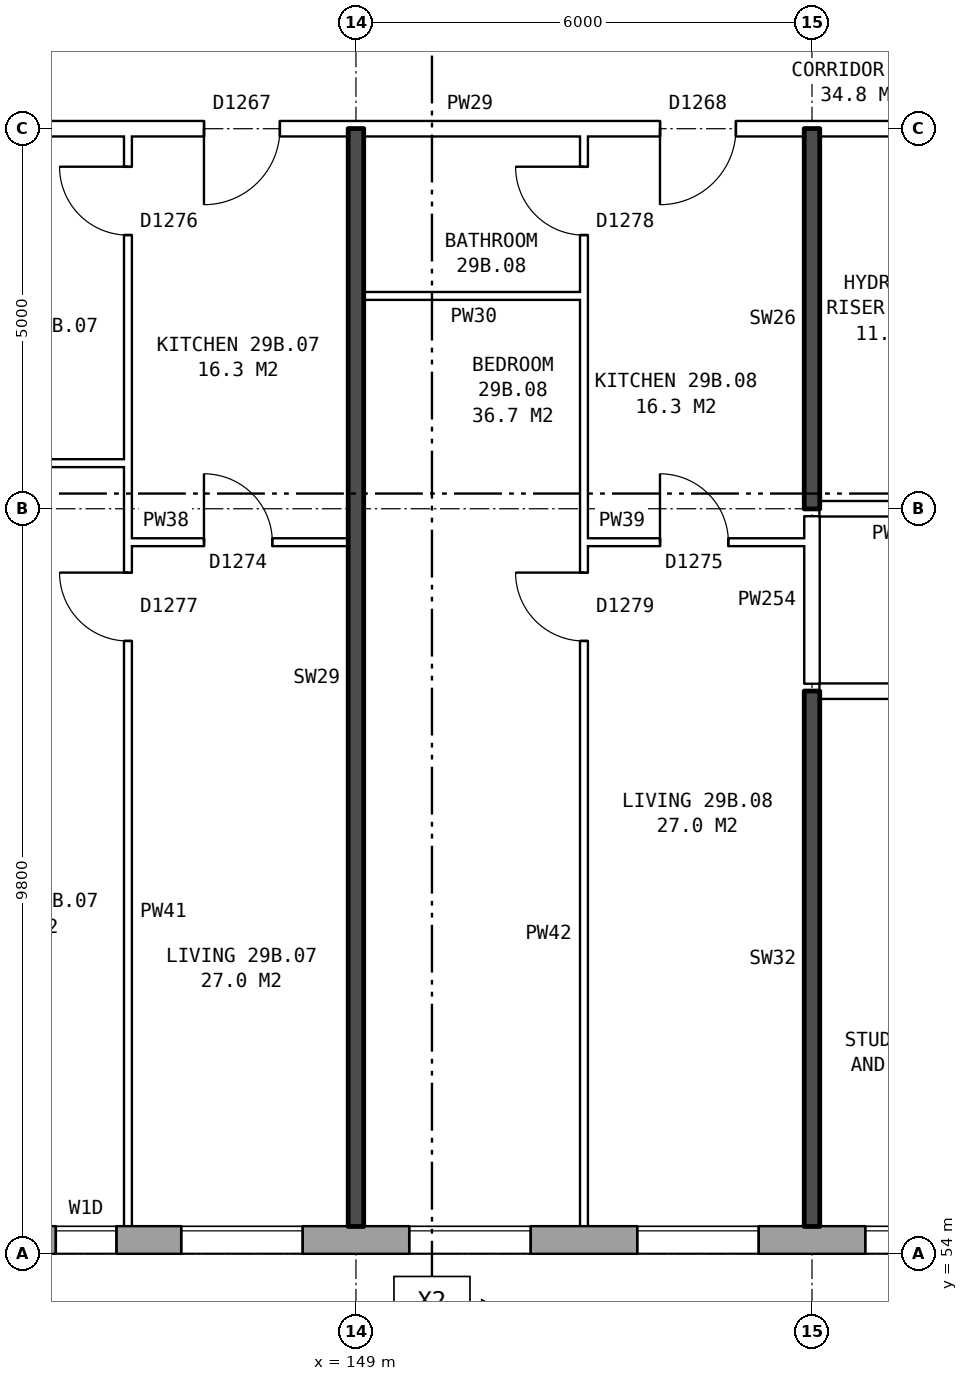
"""IFC4 building model, lengths in metres.
Left out: names, types, materials, properties, quantities, classifications, styles, units other than length and angle.
Written with IfcOpenShell. Run it as: python <this file> out.ifc"""

import sys

from ifc_helpers import new_model, si_unit, direction, frame, frame_2d, origin, place, context, subcontext, project, spatial, rectangle, extrude, element, fill, save


model = new_model("IFC4")
c1 = context("Model", 3, precision=1e-05, world=origin(), true_north=direction((0.0, 1.0)))
c2 = subcontext(c1, "Body", "Model", "MODEL_VIEW")
j1 = project(units=[si_unit("LENGTHUNIT", "METRE"), si_unit("PLANEANGLEUNIT", "RADIAN")], contexts=[c1])
p1 = place(None, origin())
s1 = spatial("IfcSite", under=j1, at=p1, CompositionType="ELEMENT")
p2 = place(p1, origin())
s2 = spatial("IfcBuilding", under=s1, at=p2, CompositionType="ELEMENT")
p3 = place(p2, frame((0.0, 0.0, 105.7)))
s3 = spatial("IfcBuildingStorey", under=s2, at=p3, CompositionType="ELEMENT", Elevation=105.7)
p4 = place(p3, frame((134.075, 54.18, 0.0), z_axis=(0.0, 0.0, 1.0), x_axis=(1.0, 0.0, 0.0)))
e1 = element("IfcWall", 1, at=p4, inside=s3, PredefinedType="STANDARD", context=c2, shape_type="SweptSolid", body=[
    extrude(rectangle(XDim=36.851, YDim=0.36, at=frame_2d((18.425, 0.0))), origin(), (0.0, 0.0, 1.0), 2.85),
])
p5 = place(p4, frame((0.625, 0.0, 0.8)))
e2 = element("IfcOpeningElement", 2, at=p5, cuts=e1, PredefinedType="OPENING", context=c2, shape_type="SweptSolid", body=[
    extrude(rectangle(XDim=1.6, YDim=1.8, at=frame_2d((0.8, 0.9))), frame((0.0, 0.19, 0.0), z_axis=(0.0, -1.0, 0.0), x_axis=(1.0, 0.0, 0.0)), (0.0, 0.0, 1.0), 0.38),
])
p6 = place(p4, frame((3.625, 0.0, 0.8)))
e3 = element("IfcOpeningElement", 3, at=p6, cuts=e1, PredefinedType="OPENING", context=c2, shape_type="SweptSolid", body=[
    extrude(rectangle(XDim=1.6, YDim=1.8, at=frame_2d((0.8, 0.9))), frame((0.0, 0.19, 0.0), z_axis=(0.0, -1.0, 0.0), x_axis=(1.0, 0.0, 0.0)), (0.0, 0.0, 1.0), 0.38),
])
p7 = place(p4, frame((6.625, 0.0, 0.8)))
e4 = element("IfcOpeningElement", 4, at=p7, cuts=e1, PredefinedType="OPENING", context=c2, shape_type="SweptSolid", body=[
    extrude(rectangle(XDim=1.6, YDim=1.8, at=frame_2d((0.8, 0.9))), frame((0.0, 0.19, 0.0), z_axis=(0.0, -1.0, 0.0), x_axis=(1.0, 0.0, 0.0)), (0.0, 0.0, 1.0), 0.38),
])
p8 = place(p4, frame((9.925, 0.0, 0.15)))
e5 = element("IfcOpeningElement", 5, at=p8, cuts=e1, PredefinedType="OPENING", context=c2, shape_type="SweptSolid", body=[
    extrude(rectangle(XDim=0.6, YDim=0.9, at=frame_2d((0.3, 0.45))), frame((0.0, 0.19, 0.0), z_axis=(0.0, -1.0, 0.0), x_axis=(1.0, 0.0, 0.0)), (0.0, 0.0, 1.0), 0.38),
])
p9 = place(p4, frame((12.625, 0.0, 0.8)))
e6 = element("IfcOpeningElement", 6, at=p9, cuts=e1, PredefinedType="OPENING", context=c2, shape_type="SweptSolid", body=[
    extrude(rectangle(XDim=1.6, YDim=1.8, at=frame_2d((0.8, 0.9))), frame((0.0, 0.19, 0.0), z_axis=(0.0, -1.0, 0.0), x_axis=(1.0, 0.0, 0.0)), (0.0, 0.0, 1.0), 0.38),
])
p10 = place(p4, frame((15.625, 0.0, 0.8)))
e7 = element("IfcOpeningElement", 7, at=p10, cuts=e1, PredefinedType="OPENING", context=c2, shape_type="SweptSolid", body=[
    extrude(rectangle(XDim=1.6, YDim=1.8, at=frame_2d((0.8, 0.9))), frame((0.0, 0.19, 0.0), z_axis=(0.0, -1.0, 0.0), x_axis=(1.0, 0.0, 0.0)), (0.0, 0.0, 1.0), 0.38),
])
p11 = place(p4, frame((18.625, 0.0, 0.8)))
e8 = element("IfcOpeningElement", 8, at=p11, cuts=e1, PredefinedType="OPENING", context=c2, shape_type="SweptSolid", body=[
    extrude(rectangle(XDim=1.6, YDim=1.8, at=frame_2d((0.8, 0.9))), frame((0.0, 0.19, 0.0), z_axis=(0.0, -1.0, 0.0), x_axis=(1.0, 0.0, 0.0)), (0.0, 0.0, 1.0), 0.38),
])
p12 = place(p4, frame((21.625, 0.0, 0.8)))
e9 = element("IfcOpeningElement", 9, at=p12, cuts=e1, PredefinedType="OPENING", context=c2, shape_type="SweptSolid", body=[
    extrude(rectangle(XDim=1.6, YDim=1.8, at=frame_2d((0.8, 0.9))), frame((0.0, 0.19, 0.0), z_axis=(0.0, -1.0, 0.0), x_axis=(1.0, 0.0, 0.0)), (0.0, 0.0, 1.0), 0.38),
])
p13 = place(p4, frame((23.525, 0.0, 0.8)))
e10 = element("IfcOpeningElement", 10, at=p13, cuts=e1, PredefinedType="OPENING", context=c2, shape_type="SweptSolid", body=[
    extrude(rectangle(XDim=1.6, YDim=1.8, at=frame_2d((0.8, 0.9))), frame((0.0, 0.19, 0.0), z_axis=(0.0, -1.0, 0.0), x_axis=(1.0, 0.0, 0.0)), (0.0, 0.0, 1.0), 0.38),
])
p14 = place(p4, frame((27.625, 0.0, 1.4)))
e11 = element("IfcOpeningElement", 11, at=p14, cuts=e1, PredefinedType="OPENING", context=c2, shape_type="SweptSolid", body=[
    extrude(rectangle(XDim=1.0, YDim=1.2, at=frame_2d((0.5, 0.6))), frame((0.0, 0.19, 0.0), z_axis=(0.0, -1.0, 0.0), x_axis=(1.0, 0.0, 0.0)), (0.0, 0.0, 1.0), 0.38),
])
p15 = place(p4, frame((30.625, 0.0, 0.8)))
e12 = element("IfcOpeningElement", 12, at=p15, cuts=e1, PredefinedType="OPENING", context=c2, shape_type="SweptSolid", body=[
    extrude(rectangle(XDim=1.6, YDim=1.8, at=frame_2d((0.8, 0.9))), frame((0.0, 0.19, 0.0), z_axis=(0.0, -1.0, 0.0), x_axis=(1.0, 0.0, 0.0)), (0.0, 0.0, 1.0), 0.38),
])
p16 = place(p4, frame((33.625, 0.0, 0.8)))
e13 = element("IfcOpeningElement", 13, at=p16, cuts=e1, PredefinedType="OPENING", context=c2, shape_type="SweptSolid", body=[
    extrude(rectangle(XDim=1.6, YDim=1.8, at=frame_2d((0.8, 0.9))), frame((0.0, 0.19, 0.0), z_axis=(0.0, -1.0, 0.0), x_axis=(1.0, 0.0, 0.0)), (0.0, 0.0, 1.0), 0.38),
])
p17 = place(p4, frame((10.975, 0.0, 0.15)))
e14 = element("IfcOpeningElement", 14, at=p17, cuts=e1, PredefinedType="OPENING", context=c2, shape_type="SweptSolid", body=[
    extrude(rectangle(XDim=0.8, YDim=1.8, at=frame_2d((0.4, 0.9))), frame((0.0, 0.19, 0.0), z_axis=(0.0, -1.0, 0.0), x_axis=(1.0, 0.0, 0.0)), (0.0, 0.0, 1.0), 0.38),
])
p18 = place(p4, frame((25.425, 0.0, 0.8)))
e15 = element("IfcOpeningElement", 15, at=p18, cuts=e1, PredefinedType="OPENING", context=c2, shape_type="SweptSolid", body=[
    extrude(rectangle(XDim=0.6, YDim=0.9, at=frame_2d((0.3, 0.45))), frame((0.0, 0.19, 0.0), z_axis=(0.0, -1.0, 0.0), x_axis=(1.0, 0.0, 0.0)), (0.0, 0.0, 1.0), 0.38),
])
p19 = place(p4, frame((28.925, 0.0, 0.8)))
e16 = element("IfcOpeningElement", 16, at=p19, cuts=e1, PredefinedType="OPENING", context=c2, shape_type="SweptSolid", body=[
    extrude(rectangle(XDim=1.4, YDim=1.8, at=frame_2d((0.7, 0.9))), frame((0.0, 0.19, 0.0), z_axis=(0.0, -1.0, 0.0), x_axis=(1.0, 0.0, 0.0)), (0.0, 0.0, 1.0), 0.38),
])
p20 = place(p3, frame((155.1, 61.4, 0.0), z_axis=(0.0, 0.0, 1.0), x_axis=(1.0, 0.0, 0.0)))
e17 = element("IfcWall", 17, at=p20, inside=s3, PredefinedType="PARTITIONING", context=c2, shape_type="SweptSolid", body=[
    extrude(rectangle(XDim=18.54, YDim=0.2, at=frame_2d((9.27, 0.0))), origin(), (0.0, 0.0, 1.0), 2.85),
])
p21 = place(p20, frame((1.45, 0.0, 0.0)))
e18 = element("IfcOpeningElement", 18, at=p21, cuts=e17, PredefinedType="OPENING", context=c2, shape_type="SweptSolid", body=[
    extrude(rectangle(XDim=1.0, YDim=2.1, at=frame_2d((0.5, 1.05))), frame((0.0, 0.11, 0.0), z_axis=(0.0, -1.0, 0.0), x_axis=(1.0, 0.0, 0.0)), (0.0, 0.0, 1.0), 0.22),
])
p22 = place(p20, frame((9.6, 0.0, 0.0)))
e19 = element("IfcOpeningElement", 19, at=p22, cuts=e17, PredefinedType="OPENING", context=c2, shape_type="SweptSolid", body=[
    extrude(rectangle(XDim=1.0, YDim=2.1, at=frame_2d((0.5, 1.05))), frame((0.0, 0.11, 0.0), z_axis=(0.0, -1.0, 0.0), x_axis=(1.0, 0.0, 0.0)), (0.0, 0.0, 1.0), 0.22),
])
p23 = place(p20, frame((13.4, 0.0, 0.0)))
e20 = element("IfcOpeningElement", 20, at=p23, cuts=e17, PredefinedType="OPENING", context=c2, shape_type="SweptSolid", body=[
    extrude(rectangle(XDim=1.0, YDim=2.1, at=frame_2d((0.5, 1.05))), frame((0.0, 0.11, 0.0), z_axis=(0.0, -1.0, 0.0), x_axis=(1.0, 0.0, 0.0)), (0.0, 0.0, 1.0), 0.22),
])
p24 = place(p3, frame((146.0, 63.36, 0.0), z_axis=(0.0, 0.0, 1.0), x_axis=(1.0, 0.0, 0.0)))
e21 = element("IfcWall", 21, at=p24, inside=s3, PredefinedType="PARTITIONING", context=c2, shape_type="SweptSolid", body=[
    extrude(rectangle(XDim=2.9, YDim=0.1, at=frame_2d((1.45, 0.0))), origin(), (0.0, 0.0, 1.0), 2.85),
])
p25 = place(p24, frame((1.0, 0.0, 0.0)))
e22 = element("IfcOpeningElement", 22, at=p25, cuts=e21, PredefinedType="OPENING", context=c2, shape_type="SweptSolid", body=[
    extrude(rectangle(XDim=0.9, YDim=2.1, at=frame_2d((0.45, 1.05))), frame((0.0, 0.06, 0.0), z_axis=(0.0, -1.0, 0.0), x_axis=(1.0, 0.0, 0.0)), (0.0, 0.0, 1.0), 0.12),
])
p26 = place(p3, frame((152.0, 63.36, 0.0), z_axis=(0.0, 0.0, 1.0), x_axis=(1.0, 0.0, 0.0)))
e23 = element("IfcWall", 23, at=p26, inside=s3, PredefinedType="PARTITIONING", context=c2, shape_type="SweptSolid", body=[
    extrude(rectangle(XDim=2.9, YDim=0.1, at=frame_2d((1.45, 0.0))), origin(), (0.0, 0.0, 1.0), 2.85),
])
p27 = place(p26, frame((1.0, 0.0, 0.0)))
e24 = element("IfcOpeningElement", 24, at=p27, cuts=e23, PredefinedType="OPENING", context=c2, shape_type="SweptSolid", body=[
    extrude(rectangle(XDim=0.9, YDim=2.1, at=frame_2d((0.45, 1.05))), frame((0.0, 0.06, 0.0), z_axis=(0.0, -1.0, 0.0), x_axis=(1.0, 0.0, 0.0)), (0.0, 0.0, 1.0), 0.12),
])
p28 = place(p3, frame((155.1, 63.8, 0.0), z_axis=(0.0, 0.0, 1.0), x_axis=(1.0, 0.0, 0.0)))
e25 = element("IfcWall", 25, at=p28, inside=s3, PredefinedType="PARTITIONING", context=c2, shape_type="SweptSolid", body=[
    extrude(rectangle(XDim=2.14, YDim=0.2, at=frame_2d((1.07, 0.0))), origin(), (0.0, 0.0, 1.0), 2.85),
])
p29 = place(p3, frame((142.76, 64.4, 0.0), z_axis=(0.0, 0.0, 1.0), x_axis=(1.0, 0.0, 0.0)))
e26 = element("IfcWall", 26, at=p29, inside=s3, PredefinedType="PARTITIONING", context=c2, shape_type="SweptSolid", body=[
    extrude(rectangle(XDim=3.24, YDim=0.1, at=frame_2d((1.62, 0.0))), origin(), (0.0, 0.0, 1.0), 2.85),
])
p30 = place(p3, frame((149.1, 66.6, 0.0), z_axis=(0.0, 0.0, 1.0), x_axis=(1.0, 0.0, 0.0)))
e27 = element("IfcWall", 27, at=p30, inside=s3, PredefinedType="PARTITIONING", context=c2, shape_type="SweptSolid", body=[
    extrude(rectangle(XDim=2.9, YDim=0.1, at=frame_2d((1.45, 0.0))), origin(), (0.0, 0.0, 1.0), 2.85),
])
p31 = place(p3, frame((142.76, 68.8, 0.0), z_axis=(0.0, 0.0, 1.0), x_axis=(1.0, 0.0, 0.0)))
e28 = element("IfcWall", 28, at=p31, inside=s3, PredefinedType="PARTITIONING", context=c2, shape_type="SweptSolid", body=[
    extrude(rectangle(XDim=14.48, YDim=0.2, at=frame_2d((7.24, 0.0))), origin(), (0.0, 0.0, 1.0), 2.85),
])
p32 = place(p31, frame((4.24, 0.0, 0.0)))
e29 = element("IfcOpeningElement", 29, at=p32, cuts=e28, PredefinedType="OPENING", context=c2, shape_type="SweptSolid", body=[
    extrude(rectangle(XDim=1.0, YDim=2.1, at=frame_2d((0.5, 1.05))), frame((0.0, 0.11, 0.0), z_axis=(0.0, -1.0, 0.0), x_axis=(1.0, 0.0, 0.0)), (0.0, 0.0, 1.0), 0.22),
])
p33 = place(p31, frame((10.24, 0.0, 0.0)))
e30 = element("IfcOpeningElement", 30, at=p33, cuts=e28, PredefinedType="OPENING", context=c2, shape_type="SweptSolid", body=[
    extrude(rectangle(XDim=1.0, YDim=2.1, at=frame_2d((0.5, 1.05))), frame((0.0, 0.11, 0.0), z_axis=(0.0, -1.0, 0.0), x_axis=(1.0, 0.0, 0.0)), (0.0, 0.0, 1.0), 0.22),
])
p34 = place(p3, frame((146.0, 54.36, 0.0), z_axis=(0.0, 0.0, 1.0), x_axis=(0.0, 1.0, 0.0)))
e31 = element("IfcWall", 31, at=p34, inside=s3, PredefinedType="PARTITIONING", context=c2, shape_type="SweptSolid", body=[
    extrude(rectangle(XDim=14.34, YDim=0.1, at=frame_2d((7.17, 0.0))), origin(), (0.0, 0.0, 1.0), 2.85),
])
p35 = place(p34, frame((7.7, 0.0, 0.0)))
e32 = element("IfcOpeningElement", 32, at=p35, cuts=e31, PredefinedType="OPENING", context=c2, shape_type="SweptSolid", body=[
    extrude(rectangle(XDim=0.9, YDim=2.1, at=frame_2d((0.45, 1.05))), frame((0.0, 0.06, 0.0), z_axis=(0.0, -1.0, 0.0), x_axis=(1.0, 0.0, 0.0)), (0.0, 0.0, 1.0), 0.12),
])
p36 = place(p34, frame((13.04, 0.0, 0.0)))
e33 = element("IfcOpeningElement", 33, at=p36, cuts=e31, PredefinedType="OPENING", context=c2, shape_type="SweptSolid", body=[
    extrude(rectangle(XDim=0.9, YDim=2.1, at=frame_2d((0.45, 1.05))), frame((0.0, 0.06, 0.0), z_axis=(0.0, -1.0, 0.0), x_axis=(1.0, 0.0, 0.0)), (0.0, 0.0, 1.0), 0.12),
])
p37 = place(p3, frame((149.0, 54.36, 0.0), z_axis=(0.0, 0.0, 1.0), x_axis=(0.0, 1.0, 0.0)))
e34 = element("IfcWall", 34, at=p37, inside=s3, PredefinedType="SOLIDWALL", context=c2, shape_type="SweptSolid", body=[
    extrude(rectangle(XDim=14.44, YDim=0.2, at=frame_2d((7.22, 0.0))), origin(), (0.0, 0.0, 1.0), 2.85),
])
p38 = place(p3, frame((152.0, 54.36, 0.0), z_axis=(0.0, 0.0, 1.0), x_axis=(0.0, 1.0, 0.0)))
e35 = element("IfcWall", 35, at=p38, inside=s3, PredefinedType="PARTITIONING", context=c2, shape_type="SweptSolid", body=[
    extrude(rectangle(XDim=14.34, YDim=0.1, at=frame_2d((7.17, 0.0))), origin(), (0.0, 0.0, 1.0), 2.85),
])
p39 = place(p38, frame((7.7, 0.0, 0.0)))
e36 = element("IfcOpeningElement", 36, at=p39, cuts=e35, PredefinedType="OPENING", context=c2, shape_type="SweptSolid", body=[
    extrude(rectangle(XDim=0.9, YDim=2.1, at=frame_2d((0.45, 1.05))), frame((0.0, 0.06, 0.0), z_axis=(0.0, -1.0, 0.0), x_axis=(1.0, 0.0, 0.0)), (0.0, 0.0, 1.0), 0.12),
])
p40 = place(p38, frame((13.04, 0.0, 0.0)))
e37 = element("IfcOpeningElement", 37, at=p40, cuts=e35, PredefinedType="OPENING", context=c2, shape_type="SweptSolid", body=[
    extrude(rectangle(XDim=0.9, YDim=2.1, at=frame_2d((0.45, 1.05))), frame((0.0, 0.06, 0.0), z_axis=(0.0, -1.0, 0.0), x_axis=(1.0, 0.0, 0.0)), (0.0, 0.0, 1.0), 0.12),
])
p41 = place(p3, frame((155.0, 54.36, 0.0), z_axis=(0.0, 0.0, 1.0), x_axis=(0.0, 1.0, 0.0)))
e38 = element("IfcWall", 38, at=p41, inside=s3, PredefinedType="SOLIDWALL", context=c2, shape_type="SweptSolid", body=[
    extrude(rectangle(XDim=7.04, YDim=0.2, at=frame_2d((3.52, 0.0))), origin(), (0.0, 0.0, 1.0), 2.85),
])
p42 = place(p3, frame((155.0, 61.5, 0.0), z_axis=(0.0, 0.0, 1.0), x_axis=(0.0, 1.0, 0.0)))
e39 = element("IfcWall", 39, at=p42, inside=s3, PredefinedType="PARTITIONING", context=c2, shape_type="SweptSolid", body=[
    extrude(rectangle(XDim=2.2, YDim=0.2, at=frame_2d((1.1, 0.0))), origin(), (0.0, 0.0, 1.0), 2.85),
])
p43 = place(p3, frame((155.0, 63.8, 0.0), z_axis=(0.0, 0.0, 1.0), x_axis=(0.0, 1.0, 0.0)))
e40 = element("IfcWall", 40, at=p43, inside=s3, PredefinedType="SOLIDWALL", context=c2, shape_type="SweptSolid", body=[
    extrude(rectangle(XDim=5.0, YDim=0.2, at=frame_2d((2.5, 0.0))), origin(), (0.0, 0.0, 1.0), 2.85),
])
p44 = place(p9, origin())
e41 = element("IfcWindow", 41, at=p44, inside=s3, PartitioningType="SINGLE_PANEL", PredefinedType="WINDOW", context=c2, shape_type="SweptSolid", body=[
    extrude(rectangle(XDim=1.6, YDim=1.8, at=frame_2d((0.8, 0.9))), frame((0.0, 0.15, 0.0), z_axis=(0.0, -1.0, 0.0), x_axis=(1.0, 0.0, 0.0)), (0.0, 0.0, 1.0), 0.06),
])
fill(e6, e41)
p45 = place(p10, origin())
e42 = element("IfcWindow", 42, at=p45, inside=s3, PartitioningType="SINGLE_PANEL", PredefinedType="WINDOW", context=c2, shape_type="SweptSolid", body=[
    extrude(rectangle(XDim=1.6, YDim=1.8, at=frame_2d((0.8, 0.9))), frame((0.0, 0.15, 0.0), z_axis=(0.0, -1.0, 0.0), x_axis=(1.0, 0.0, 0.0)), (0.0, 0.0, 1.0), 0.06),
])
fill(e7, e42)
p46 = place(p11, origin())
e43 = element("IfcWindow", 43, at=p46, inside=s3, PartitioningType="SINGLE_PANEL", PredefinedType="WINDOW", context=c2, shape_type="SweptSolid", body=[
    extrude(rectangle(XDim=1.6, YDim=1.8, at=frame_2d((0.8, 0.9))), frame((0.0, 0.15, 0.0), z_axis=(0.0, -1.0, 0.0), x_axis=(1.0, 0.0, 0.0)), (0.0, 0.0, 1.0), 0.06),
])
fill(e8, e43)
p47 = place(p12, origin())
e44 = element("IfcWindow", 44, at=p47, inside=s3, PartitioningType="SINGLE_PANEL", PredefinedType="WINDOW", context=c2, shape_type="SweptSolid", body=[
    extrude(rectangle(XDim=1.6, YDim=1.8, at=frame_2d((0.8, 0.9))), frame((0.0, 0.15, 0.0), z_axis=(0.0, -1.0, 0.0), x_axis=(1.0, 0.0, 0.0)), (0.0, 0.0, 1.0), 0.06),
])
fill(e9, e44)
p48 = place(p35, origin())
e45 = element("IfcDoor", 45, at=p48, inside=s3, OperationType="SINGLE_SWING_RIGHT", PredefinedType="DOOR", context=c2, shape_type="SweptSolid", body=[
    extrude(rectangle(XDim=0.9, YDim=2.1, at=frame_2d((0.45, 1.05))), frame((0.0, 0.025, 0.0), z_axis=(0.0, -1.0, 0.0), x_axis=(1.0, 0.0, 0.0)), (0.0, 0.0, 1.0), 0.05),
])
fill(e32, e45)
p49 = place(p32, frame((1.0, 0.0, 0.0), z_axis=(0.0, 0.0, 1.0), x_axis=(-1.0, 0.0, 0.0)))
e46 = element("IfcDoor", 46, at=p49, inside=s3, OperationType="SINGLE_SWING_RIGHT", PredefinedType="DOOR", context=c2, shape_type="SweptSolid", body=[
    extrude(rectangle(XDim=1.0, YDim=2.1, at=frame_2d((0.5, 1.05))), frame((0.0, 0.025, 0.0), z_axis=(0.0, -1.0, 0.0), x_axis=(1.0, 0.0, 0.0)), (0.0, 0.0, 1.0), 0.05),
])
fill(e29, e46)
p50 = place(p25, origin())
e47 = element("IfcDoor", 47, at=p50, inside=s3, OperationType="SINGLE_SWING_LEFT", PredefinedType="DOOR", context=c2, shape_type="SweptSolid", body=[
    extrude(rectangle(XDim=0.9, YDim=2.1, at=frame_2d((0.45, 1.05))), frame((0.0, 0.025, 0.0), z_axis=(0.0, -1.0, 0.0), x_axis=(1.0, 0.0, 0.0)), (0.0, 0.0, 1.0), 0.05),
])
fill(e22, e47)
p51 = place(p36, origin())
e48 = element("IfcDoor", 48, at=p51, inside=s3, OperationType="SINGLE_SWING_RIGHT", PredefinedType="DOOR", context=c2, shape_type="SweptSolid", body=[
    extrude(rectangle(XDim=0.9, YDim=2.1, at=frame_2d((0.45, 1.05))), frame((0.0, 0.025, 0.0), z_axis=(0.0, -1.0, 0.0), x_axis=(1.0, 0.0, 0.0)), (0.0, 0.0, 1.0), 0.05),
])
fill(e33, e48)
p52 = place(p39, origin())
e49 = element("IfcDoor", 49, at=p52, inside=s3, OperationType="SINGLE_SWING_RIGHT", PredefinedType="DOOR", context=c2, shape_type="SweptSolid", body=[
    extrude(rectangle(XDim=0.9, YDim=2.1, at=frame_2d((0.45, 1.05))), frame((0.0, 0.025, 0.0), z_axis=(0.0, -1.0, 0.0), x_axis=(1.0, 0.0, 0.0)), (0.0, 0.0, 1.0), 0.05),
])
fill(e36, e49)
p53 = place(p33, frame((1.0, 0.0, 0.0), z_axis=(0.0, 0.0, 1.0), x_axis=(-1.0, 0.0, 0.0)))
e50 = element("IfcDoor", 50, at=p53, inside=s3, OperationType="SINGLE_SWING_RIGHT", PredefinedType="DOOR", context=c2, shape_type="SweptSolid", body=[
    extrude(rectangle(XDim=1.0, YDim=2.1, at=frame_2d((0.5, 1.05))), frame((0.0, 0.025, 0.0), z_axis=(0.0, -1.0, 0.0), x_axis=(1.0, 0.0, 0.0)), (0.0, 0.0, 1.0), 0.05),
])
fill(e30, e50)
p54 = place(p27, origin())
e51 = element("IfcDoor", 51, at=p54, inside=s3, OperationType="SINGLE_SWING_LEFT", PredefinedType="DOOR", context=c2, shape_type="SweptSolid", body=[
    extrude(rectangle(XDim=0.9, YDim=2.1, at=frame_2d((0.45, 1.05))), frame((0.0, 0.025, 0.0), z_axis=(0.0, -1.0, 0.0), x_axis=(1.0, 0.0, 0.0)), (0.0, 0.0, 1.0), 0.05),
])
fill(e24, e51)
p55 = place(p40, origin())
e52 = element("IfcDoor", 52, at=p55, inside=s3, OperationType="SINGLE_SWING_RIGHT", PredefinedType="DOOR", context=c2, shape_type="SweptSolid", body=[
    extrude(rectangle(XDim=0.9, YDim=2.1, at=frame_2d((0.45, 1.05))), frame((0.0, 0.025, 0.0), z_axis=(0.0, -1.0, 0.0), x_axis=(1.0, 0.0, 0.0)), (0.0, 0.0, 1.0), 0.05),
])
fill(e37, e52)
p56 = place(p17, origin())
e53 = element("IfcWindow", 53, at=p56, inside=s3, PartitioningType="SINGLE_PANEL", PredefinedType="WINDOW", context=c2, shape_type="SweptSolid", body=[
    extrude(rectangle(XDim=0.8, YDim=1.8, at=frame_2d((0.4, 0.9))), frame((0.0, 0.15, 0.0), z_axis=(0.0, -1.0, 0.0), x_axis=(1.0, 0.0, 0.0)), (0.0, 0.0, 1.0), 0.06),
])
fill(e14, e53)
save(model, sys.argv[1])
